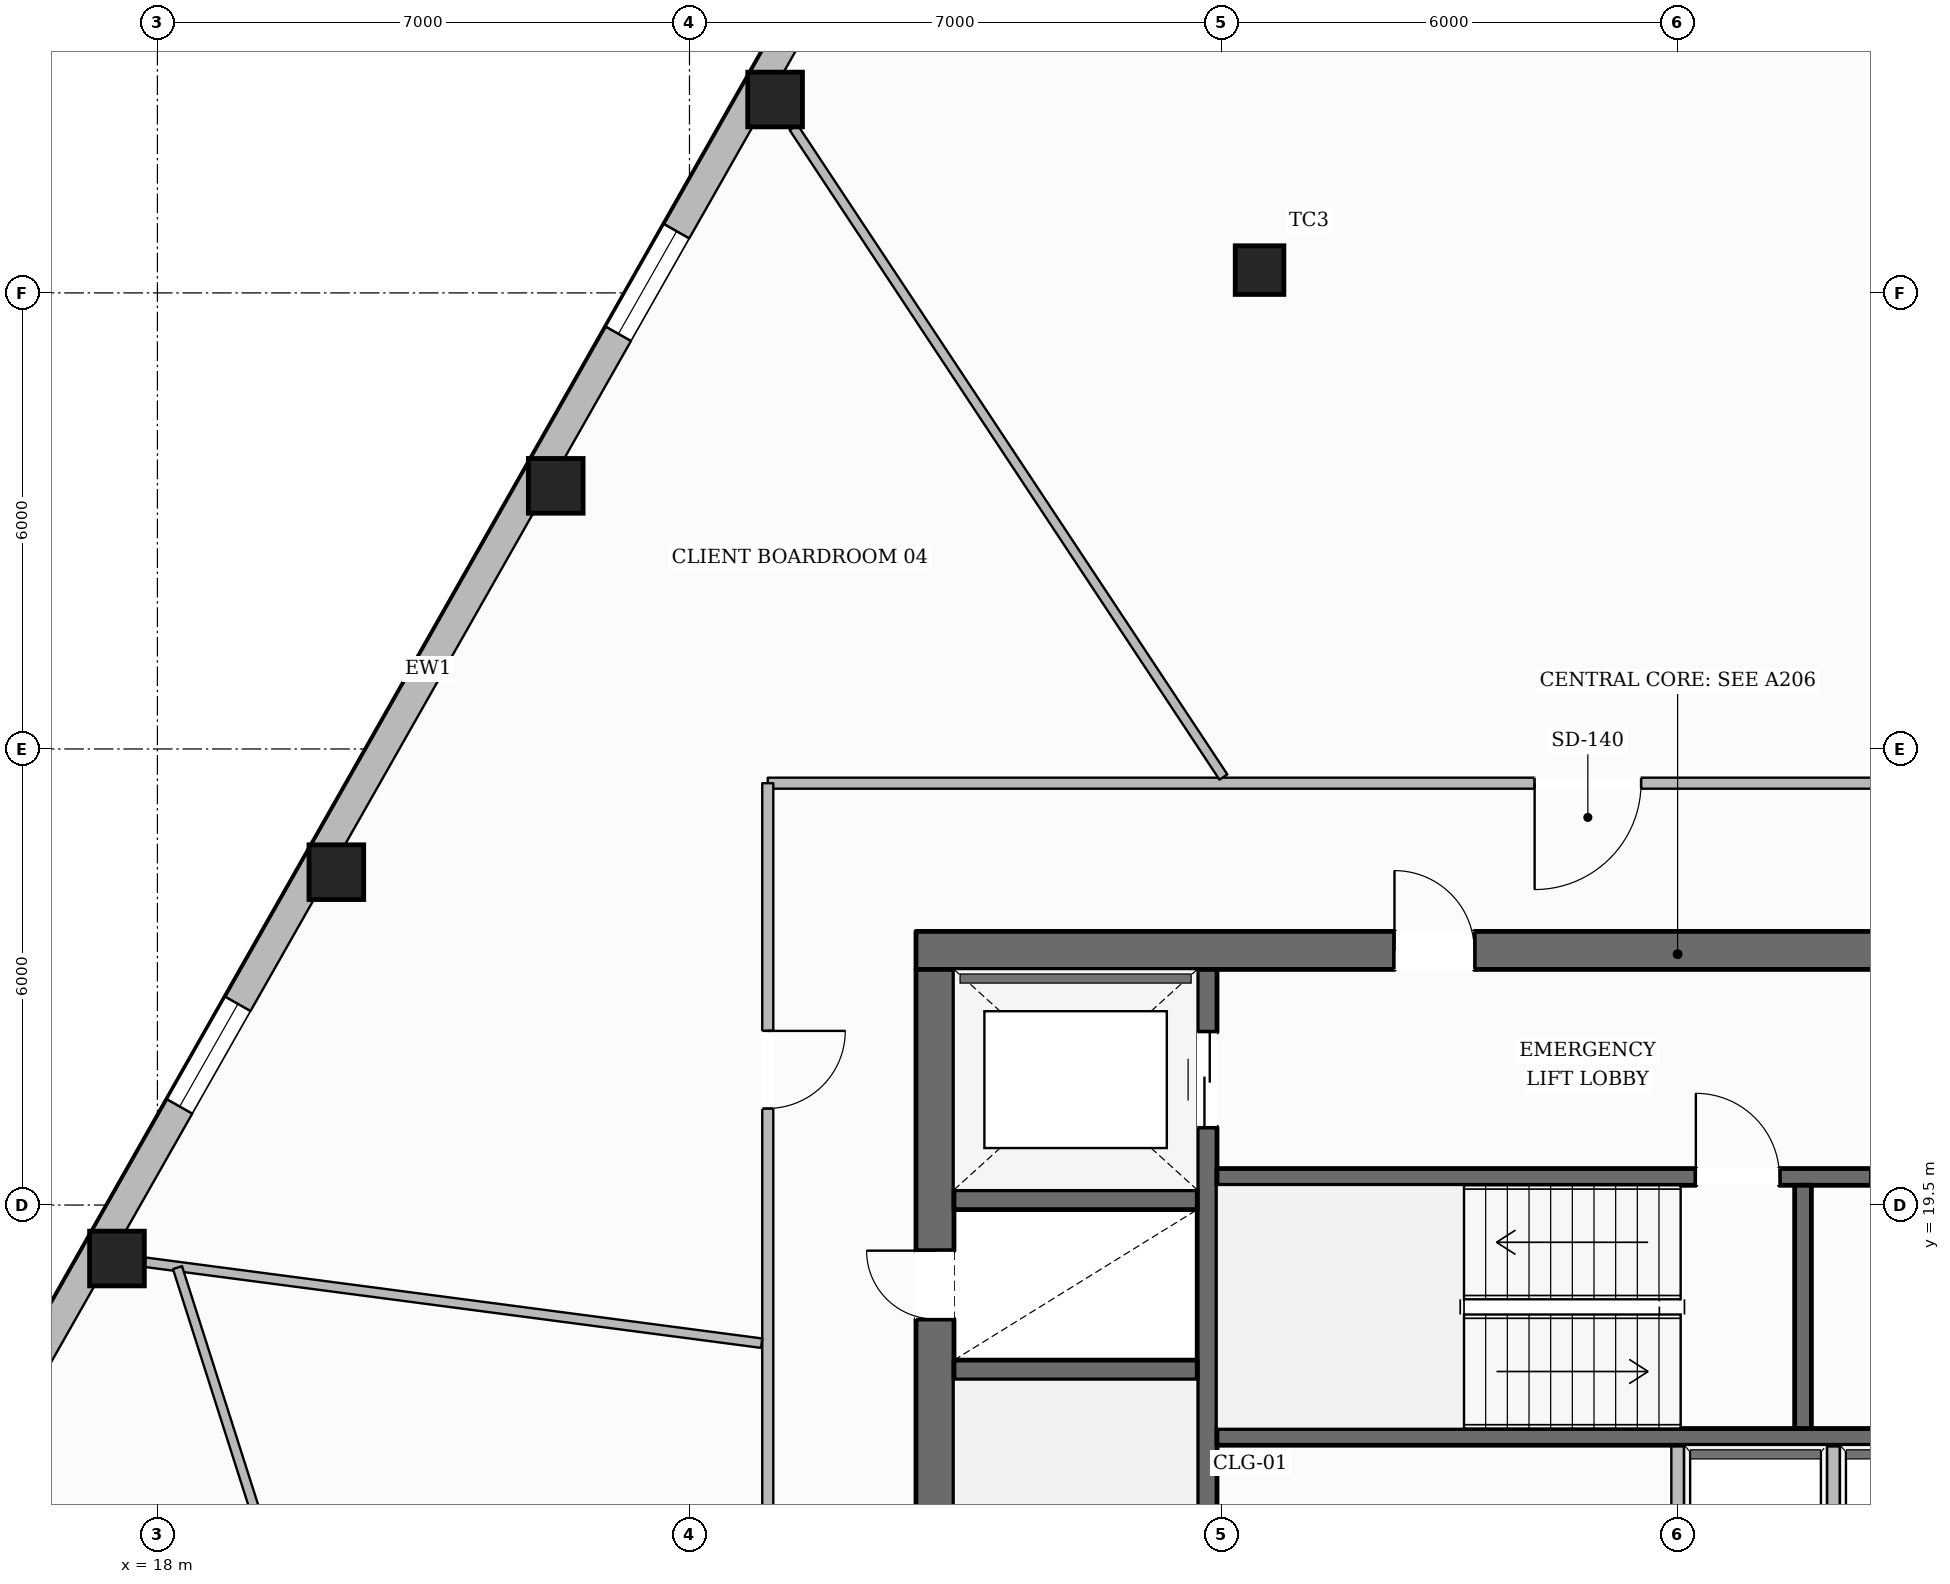
"""IFC4 building model, lengths in metres.
Left out: names, types, materials, properties, quantities, classifications, styles, units other than length and angle.
Written with IfcOpenShell. Run it as: python <this file> out.ifc"""

import sys

from ifc_helpers import new_model, si_unit, direction, frame, frame_2d, origin, origin_2d, place, context, subcontext, project, spatial, rectangle, hollow_rectangle, extrude, element, fill, save


model = new_model("IFC4")
c1 = context("Model", 3, precision=1e-05, world=origin(), true_north=direction((0.0, 1.0)))
c2 = subcontext(c1, "Body", "Model", "MODEL_VIEW")
j1 = project(units=[si_unit("LENGTHUNIT", "METRE"), si_unit("PLANEANGLEUNIT", "RADIAN")], contexts=[c1])
p1 = place(None, origin())
s1 = spatial("IfcSite", under=j1, at=p1, CompositionType="ELEMENT")
p2 = place(p1, origin())
s2 = spatial("IfcBuilding", under=s1, at=p2, CompositionType="ELEMENT")
p3 = place(p2, frame((0.0, 0.0, 97.05)))
s3 = spatial("IfcBuildingStorey", under=s2, at=p3, CompositionType="ELEMENT", Elevation=97.05)
p4 = place(p3, frame((27.98, 22.85, 0.0), z_axis=(0.0, 0.0, 1.0), x_axis=(1.0, 0.0, 0.0)))
e1 = element("IfcWall", 1, at=p4, inside=s3, PredefinedType="SOLIDWALL", context=c2, shape_type="SweptSolid", body=[
    extrude(rectangle(XDim=20.04, YDim=0.5, at=frame_2d((10.02, 0.0))), origin(), (0.0, 0.0, 1.0), 3.6),
])
p5 = place(p4, frame((6.295, 0.0, 0.0)))
e2 = element("IfcOpeningElement", 2, at=p5, cuts=e1, PredefinedType="OPENING", context=c2, shape_type="SweptSolid", body=[
    extrude(rectangle(XDim=1.05, YDim=2.15, at=frame_2d((0.525, 1.075))), frame((0.0, 0.26, 0.0), z_axis=(0.0, -1.0, 0.0), x_axis=(1.0, 0.0, 0.0)), (0.0, 0.0, 1.0), 0.52),
])
p6 = place(p4, frame((12.695, 0.0, 0.0)))
e3 = element("IfcOpeningElement", 3, at=p6, cuts=e1, PredefinedType="OPENING", context=c2, shape_type="SweptSolid", body=[
    extrude(rectangle(XDim=1.05, YDim=2.15, at=frame_2d((0.525, 1.075))), frame((0.0, 0.26, 0.0), z_axis=(0.0, -1.0, 0.0), x_axis=(1.0, 0.0, 0.0)), (0.0, 0.0, 1.0), 0.52),
])
p7 = place(p3, frame((28.23, 9.6, 0.0), z_axis=(0.0, 0.0, 1.0), x_axis=(0.0, 1.0, 0.0)))
e4 = element("IfcWall", 4, at=p7, inside=s3, PredefinedType="SOLIDWALL", context=c2, shape_type="SweptSolid", body=[
    extrude(rectangle(XDim=13.0, YDim=0.5, at=frame_2d((6.5, 0.0))), origin(), (0.0, 0.0, 1.0), 3.6),
])
p8 = place(p7, frame((0.2, 0.0, 0.0)))
e5 = element("IfcOpeningElement", 5, at=p8, cuts=e4, PredefinedType="OPENING", context=c2, shape_type="SweptSolid", body=[
    extrude(rectangle(XDim=1.1, YDim=2.15, at=frame_2d((0.55, 1.075))), frame((0.0, 0.26, 0.0), z_axis=(0.0, -1.0, 0.0), x_axis=(1.0, 0.0, 0.0)), (0.0, 0.0, 1.0), 0.52),
])
p9 = place(p7, frame((8.4, 0.0, 0.0)))
e6 = element("IfcOpeningElement", 6, at=p9, cuts=e4, PredefinedType="OPENING", context=c2, shape_type="SweptSolid", body=[
    extrude(rectangle(XDim=0.9, YDim=2.1, at=frame_2d((0.45, 1.05))), frame((0.0, 0.26, 0.0), z_axis=(0.0, -1.0, 0.0), x_axis=(1.0, 0.0, 0.0)), (0.0, 0.0, 1.0), 0.52),
])
p10 = place(p3, frame((31.81, 9.6, 0.0), z_axis=(0.0, 0.0, 1.0), x_axis=(0.0, 1.0, 0.0)))
e7 = element("IfcWall", 7, at=p10, inside=s3, PredefinedType="SHEAR", context=c2, shape_type="SweptSolid", body=[
    extrude(rectangle(XDim=13.0, YDim=0.26, at=frame_2d((6.5, 0.0))), origin(), (0.0, 0.0, 1.0), 3.6),
])
p11 = place(p10, frame((10.925, 0.0, 0.0)))
e8 = element("IfcOpeningElement", 8, at=p11, cuts=e7, PredefinedType="OPENING", context=c2, shape_type="SweptSolid", body=[
    extrude(rectangle(XDim=1.25, YDim=2.25, at=frame_2d((0.625, 1.125))), frame((0.0, 0.14, 0.0), z_axis=(0.0, -1.0, 0.0), x_axis=(1.0, 0.0, 0.0)), (0.0, 0.0, 1.0), 0.28),
])
for number, where, z_axis, x_axis in (
    (9, (28.48, 17.33, 0.0), (0.0, 0.0, 1.0), (1.0, 0.0, 0.0)),
    (10, (28.48, 19.57, 0.0), (0.0, 0.0, 1.0), (1.0, 0.0, 0.0)),
):
    element("IfcWall", number, at=place(p3, frame(where, z_axis=z_axis, x_axis=x_axis)), inside=s3, PredefinedType="SHEAR", context=c2, shape_type="SweptSolid", body=[
        extrude(rectangle(XDim=3.2, YDim=0.26, at=frame_2d((1.6, 0.0))), origin(), (0.0, 0.0, 1.0), 3.6),
    ])
p12 = place(p3, frame((31.94, 19.87, 0.0), z_axis=(0.0, 0.0, 1.0), x_axis=(1.0, 0.0, 0.0)))
e11 = element("IfcWall", 11, at=p12, inside=s3, PredefinedType="SOLIDWALL", context=c2, shape_type="SweptSolid", body=[
    extrude(rectangle(XDim=12.12, YDim=0.22, at=frame_2d((6.06, 0.0))), origin(), (0.0, 0.0, 1.0), 3.6),
])
p13 = place(p12, frame((6.3, 0.0, 0.0)))
e12 = element("IfcOpeningElement", 12, at=p13, cuts=e11, PredefinedType="OPENING", context=c2, shape_type="SweptSolid", body=[
    extrude(rectangle(XDim=1.1, YDim=2.15, at=frame_2d((0.55, 1.075))), frame((0.0, 0.12, 0.0), z_axis=(0.0, -1.0, 0.0), x_axis=(1.0, 0.0, 0.0)), (0.0, 0.0, 1.0), 0.24),
])
p14 = place(p12, frame((8.61, 0.0, 0.0)))
e13 = element("IfcOpeningElement", 13, at=p14, cuts=e11, PredefinedType="OPENING", context=c2, shape_type="SweptSolid", body=[
    extrude(rectangle(XDim=0.9, YDim=2.1, at=frame_2d((0.45, 1.05))), frame((0.0, 0.12, 0.0), z_axis=(0.0, -1.0, 0.0), x_axis=(1.0, 0.0, 0.0)), (0.0, 0.0, 1.0), 0.24),
])
p15 = place(p12, frame((10.85, 0.0, 0.0)))
e14 = element("IfcOpeningElement", 14, at=p15, cuts=e11, PredefinedType="OPENING", context=c2, shape_type="SweptSolid", body=[
    extrude(rectangle(XDim=0.9, YDim=2.1, at=frame_2d((0.45, 1.05))), frame((0.0, 0.12, 0.0), z_axis=(0.0, -1.0, 0.0), x_axis=(1.0, 0.0, 0.0)), (0.0, 0.0, 1.0), 0.24),
])
p16 = place(p3, frame((31.94, 16.45, 0.0), z_axis=(0.0, 0.0, 1.0), x_axis=(1.0, 0.0, 0.0)))
e15 = element("IfcWall", 15, at=p16, inside=s3, PredefinedType="SOLIDWALL", context=c2, shape_type="SweptSolid", body=[
    extrude(rectangle(XDim=12.12, YDim=0.22, at=frame_2d((6.06, 0.0))), origin(), (0.0, 0.0, 1.0), 3.6),
])
p17 = place(p3, frame((39.65, 16.56, 0.0), z_axis=(0.0, 0.0, 1.0), x_axis=(0.0, 1.0, 0.0)))
e16 = element("IfcWall", 16, at=p17, inside=s3, PredefinedType="SOLIDWALL", context=c2, shape_type="SweptSolid", body=[
    extrude(rectangle(XDim=3.2, YDim=0.22, at=frame_2d((1.6, 0.0))), origin(), (0.0, 0.0, 1.0), 3.6),
])
for number, where, z_axis, x_axis in (
    (17, (26.126, 34.044, 0.0), (0.0, 0.0, 1.0), (1.0, 0.0, 0.0)),
    (18, (23.24, 28.962, 0.0), (0.0, 0.0, 1.0), (1.0, 0.0, 0.0)),
    (19, (20.354, 23.879, 0.0), (0.0, 0.0, 1.0), (1.0, 0.0, 0.0)),
    (20, (17.468, 18.796, 0.0), (0.0, 0.0, 1.0), (1.0, 0.0, 0.0)),
):
    element("IfcColumn", number, at=place(p3, frame(where, z_axis=z_axis, x_axis=x_axis)), inside=s3, PredefinedType="COLUMN", context=c2, shape_type="SweptSolid", body=[
        extrude(hollow_rectangle(XDim=0.72, YDim=0.72, WallThickness=0.032, at=origin_2d()), origin(), (0.0, 0.0, 1.0), 3.6),
    ])
p18 = place(p3, frame((32.5, 31.8, 0.0), z_axis=(0.0, 0.0, 1.0), x_axis=(1.0, 0.0, 0.0)))
e21 = element("IfcColumn", 21, at=p18, inside=s3, PredefinedType="COLUMN", context=c2, shape_type="SweptSolid", body=[
    extrude(hollow_rectangle(XDim=0.64, YDim=0.64, WallThickness=0.028, at=origin_2d()), origin(), (0.0, 0.0, 1.0), 3.6),
])
p19 = place(p3, frame((14.113, 13.436, 0.0), z_axis=(0.0, 0.0, 1.0), x_axis=(0.493785476093, 0.869583753068, 0.0)))
e22 = element("IfcWall", 22, at=p19, inside=s3, PredefinedType="STANDARD", context=c2, shape_type="SweptSolid", body=[
    extrude(rectangle(XDim=36.023, YDim=0.38, at=frame_2d((18.011, 0.0))), origin(), (0.0, 0.0, 1.0), 3.059),
])
p20 = place(p19, frame((26.417, 0.0, 0.0)))
e23 = element("IfcOpeningElement", 23, at=p20, cuts=e22, PredefinedType="OPENING", context=c2, shape_type="SweptSolid", body=[
    extrude(rectangle(XDim=1.0, YDim=2.2, at=frame_2d((0.5, 1.1))), frame((0.0, 0.2, 0.0), z_axis=(0.0, -1.0, 0.0), x_axis=(1.0, 0.0, 0.0)), (0.0, 0.0, 1.0), 0.4),
])
p21 = place(p19, frame((31.845, 0.0, 0.65)))
e24 = element("IfcOpeningElement", 24, at=p21, cuts=e22, PredefinedType="OPENING", context=c2, shape_type="SweptSolid", body=[
    extrude(rectangle(XDim=1.55, YDim=1.75, at=frame_2d((0.775, 0.875))), frame((0.0, 0.2, 0.0), z_axis=(0.0, -1.0, 0.0), x_axis=(1.0, 0.0, 0.0)), (0.0, 0.0, 1.0), 0.4),
])
p22 = place(p19, frame((20.156, 0.0, 0.65)))
e25 = element("IfcOpeningElement", 25, at=p22, cuts=e22, PredefinedType="OPENING", context=c2, shape_type="SweptSolid", body=[
    extrude(rectangle(XDim=1.55, YDim=1.75, at=frame_2d((0.775, 0.875))), frame((0.0, 0.2, 0.0), z_axis=(0.0, -1.0, 0.0), x_axis=(1.0, 0.0, 0.0)), (0.0, 0.0, 1.0), 0.4),
])
p23 = place(p19, frame((8.466, 0.0, 0.65)))
e26 = element("IfcOpeningElement", 26, at=p23, cuts=e22, PredefinedType="OPENING", context=c2, shape_type="SweptSolid", body=[
    extrude(rectangle(XDim=1.55, YDim=1.75, at=frame_2d((0.775, 0.875))), frame((0.0, 0.2, 0.0), z_axis=(0.0, -1.0, 0.0), x_axis=(1.0, 0.0, 0.0)), (0.0, 0.0, 1.0), 0.4),
])
p24 = place(p19, frame((2.621, 0.0, 0.65)))
e27 = element("IfcOpeningElement", 27, at=p24, cuts=e22, PredefinedType="OPENING", context=c2, shape_type="SweptSolid", body=[
    extrude(rectangle(XDim=1.55, YDim=1.75, at=frame_2d((0.775, 0.875))), frame((0.0, 0.2, 0.0), z_axis=(0.0, -1.0, 0.0), x_axis=(1.0, 0.0, 0.0)), (0.0, 0.0, 1.0), 0.4),
])
for number, where, z_axis, x_axis in (
    (28, (38.0, 14.1, 0.0), (0.0, 0.0, 1.0), (0.0, 1.0, 0.0)),
    (29, (40.05, 14.1, 0.0), (0.0, 0.0, 1.0), (0.0, 1.0, 0.0)),
):
    element("IfcWall", number, at=place(p3, frame(where, z_axis=z_axis, x_axis=x_axis)), inside=s3, PredefinedType="PARTITIONING", context=c2, shape_type="SweptSolid", body=[
        extrude(rectangle(XDim=2.24, YDim=0.165, at=frame_2d((1.12, 0.0))), origin(), (0.0, 0.0, 1.0), 3.6),
    ])
p25 = place(p3, frame((49.97, 25.05, 0.0), z_axis=(0.0, 0.0, 1.0), x_axis=(-1.0, 0.0, 0.0)))
e30 = element("IfcWall", 30, at=p25, inside=s3, PredefinedType="PARTITIONING", context=c2, shape_type="SweptSolid", body=[
    extrude(rectangle(XDim=23.94, YDim=0.145, at=frame_2d((11.97, 0.0))), origin(), (0.0, 0.0, 1.0), 3.6),
])
p26 = place(p25, frame((3.577, 0.0, 0.0)))
e31 = element("IfcOpeningElement", 31, at=p26, cuts=e30, PredefinedType="OPENING", context=c2, shape_type="SweptSolid", body=[
    extrude(rectangle(XDim=1.02, YDim=2.15, at=frame_2d((0.51, 1.075))), frame((0.0, 0.083, 0.0), z_axis=(0.0, -1.0, 0.0), x_axis=(1.0, 0.0, 0.0)), (0.0, 0.0, 1.0), 0.165),
])
p27 = place(p25, frame((12.451, 0.0, 0.0)))
e32 = element("IfcOpeningElement", 32, at=p27, cuts=e30, PredefinedType="OPENING", context=c2, shape_type="SweptSolid", body=[
    extrude(rectangle(XDim=1.4, YDim=2.2, at=frame_2d((0.7, 1.1))), frame((0.0, 0.083, 0.0), z_axis=(0.0, -1.0, 0.0), x_axis=(1.0, 0.0, 0.0)), (0.0, 0.0, 1.0), 0.165),
])
p28 = place(p3, frame((26.03, 25.05, 0.0), z_axis=(0.0, 0.0, 1.0), x_axis=(0.0, -1.0, 0.0)))
e33 = element("IfcWall", 33, at=p28, inside=s3, PredefinedType="PARTITIONING", context=c2, shape_type="SweptSolid", body=[
    extrude(rectangle(XDim=17.9, YDim=0.145, at=frame_2d((8.95, 0.0))), origin(), (0.0, 0.0, 1.0), 3.288),
])
p29 = place(p28, frame((3.259, 0.0, 0.0)))
e34 = element("IfcOpeningElement", 34, at=p29, cuts=e33, PredefinedType="OPENING", context=c2, shape_type="SweptSolid", body=[
    extrude(rectangle(XDim=1.02, YDim=2.15, at=frame_2d((0.51, 1.075))), frame((0.0, 0.083, 0.0), z_axis=(0.0, -1.0, 0.0), x_axis=(1.0, 0.0, 0.0)), (0.0, 0.0, 1.0), 0.165),
])
p30 = place(p28, frame((12.038, 0.0, 0.0)))
e35 = element("IfcOpeningElement", 35, at=p30, cuts=e33, PredefinedType="OPENING", context=c2, shape_type="SweptSolid", body=[
    extrude(rectangle(XDim=1.02, YDim=2.15, at=frame_2d((0.51, 1.075))), frame((0.0, 0.083, 0.0), z_axis=(0.0, -1.0, 0.0), x_axis=(1.0, 0.0, 0.0)), (0.0, 0.0, 1.0), 0.165),
])
p31 = place(p3, frame((32.025, 25.131, 0.0), z_axis=(0.0, 0.0, 1.0), x_axis=(-0.55183790472, 0.833951393616, 0.0)))
e36 = element("IfcWall", 36, at=p31, inside=s3, PredefinedType="PARTITIONING", context=c2, shape_type="SweptSolid", body=[
    extrude(rectangle(XDim=10.247, YDim=0.125, at=frame_2d((5.124, 0.0))), origin(), (0.0, 0.0, 1.0), 3.6),
])
p32 = place(p3, frame((25.949, 17.683, 0.0), z_axis=(0.0, 0.0, 1.0), x_axis=(-0.991488077313, 0.130197513598, 0.0)))
e37 = element("IfcWall", 37, at=p32, inside=s3, PredefinedType="PARTITIONING", context=c2, shape_type="SweptSolid", body=[
    extrude(rectangle(XDim=8.183, YDim=0.125, at=frame_2d((4.092, 0.0))), origin(), (0.0, 0.0, 1.0), 3.141),
])
p33 = place(p3, frame((18.264, 18.677, 0.0), z_axis=(0.0, 0.0, 1.0), x_axis=(0.303993518428, -0.95267409997, 0.0)))
e38 = element("IfcWall", 38, at=p33, inside=s3, PredefinedType="PARTITIONING", context=c2, shape_type="SweptSolid", body=[
    extrude(rectangle(XDim=16.673, YDim=0.125, at=frame_2d((8.336, 0.0))), origin(), (0.0, 0.0, 1.0), 3.288),
])
p34 = place(p33, frame((7.941, 0.0, 0.0)))
e39 = element("IfcOpeningElement", 39, at=p34, cuts=e38, PredefinedType="OPENING", context=c2, shape_type="SweptSolid", body=[
    extrude(rectangle(XDim=1.02, YDim=2.15, at=frame_2d((0.51, 1.075))), frame((0.0, 0.073, 0.0), z_axis=(0.0, -1.0, 0.0), x_axis=(1.0, 0.0, 0.0)), (0.0, 0.0, 1.0), 0.145),
])
p35 = place(p22, origin())
e40 = element("IfcWindow", 40, at=p35, inside=s3, PartitioningType="SINGLE_PANEL", PredefinedType="WINDOW", context=c2, shape_type="SweptSolid", body=[
    extrude(rectangle(XDim=1.55, YDim=1.75, at=frame_2d((0.775, 0.875))), frame((0.0, 0.03, 0.0), z_axis=(0.0, -1.0, 0.0), x_axis=(1.0, 0.0, 0.0)), (0.0, 0.0, 1.0), 0.06),
])
fill(e25, e40)
p36 = place(p23, origin())
e41 = element("IfcWindow", 41, at=p36, inside=s3, PartitioningType="SINGLE_PANEL", PredefinedType="WINDOW", context=c2, shape_type="SweptSolid", body=[
    extrude(rectangle(XDim=1.55, YDim=1.75, at=frame_2d((0.775, 0.875))), frame((0.0, 0.03, 0.0), z_axis=(0.0, -1.0, 0.0), x_axis=(1.0, 0.0, 0.0)), (0.0, 0.0, 1.0), 0.06),
])
fill(e26, e41)
p37 = place(p13, origin())
e42 = element("IfcDoor", 42, at=p37, inside=s3, OperationType="SINGLE_SWING_LEFT", PredefinedType="DOOR", context=c2, shape_type="SweptSolid", body=[
    extrude(rectangle(XDim=1.1, YDim=2.15, at=frame_2d((0.55, 1.075))), frame((0.0, 0.025, 0.0), z_axis=(0.0, -1.0, 0.0), x_axis=(1.0, 0.0, 0.0)), (0.0, 0.0, 1.0), 0.05),
])
fill(e12, e42)
p38 = place(p9, origin())
e43 = element("IfcDoor", 43, at=p38, inside=s3, OperationType="SINGLE_SWING_RIGHT", PredefinedType="DOOR", context=c2, shape_type="SweptSolid", body=[
    extrude(rectangle(XDim=0.9, YDim=2.1, at=frame_2d((0.45, 1.05))), frame((0.0, 0.025, 0.0), z_axis=(0.0, -1.0, 0.0), x_axis=(1.0, 0.0, 0.0)), (0.0, 0.0, 1.0), 0.05),
])
fill(e6, e43)
p39 = place(p5, origin())
e44 = element("IfcDoor", 44, at=p39, inside=s3, OperationType="SINGLE_SWING_LEFT", PredefinedType="DOOR", context=c2, shape_type="SweptSolid", body=[
    extrude(rectangle(XDim=1.05, YDim=2.15, at=frame_2d((0.525, 1.075))), frame((0.0, 0.025, 0.0), z_axis=(0.0, -1.0, 0.0), x_axis=(1.0, 0.0, 0.0)), (0.0, 0.0, 1.0), 0.05),
])
fill(e2, e44)
p40 = place(p11, origin())
e45 = element("IfcDoor", 45, at=p40, inside=s3, OperationType="DOUBLE_DOOR_SLIDING", PredefinedType="DOOR", context=c2, shape_type="SweptSolid", body=[
    extrude(rectangle(XDim=1.25, YDim=2.25, at=frame_2d((0.625, 1.125))), frame((0.0, 0.025, 0.0), z_axis=(0.0, -1.0, 0.0), x_axis=(1.0, 0.0, 0.0)), (0.0, 0.0, 1.0), 0.05),
])
fill(e8, e45)
p41 = place(p27, origin())
e46 = element("IfcDoor", 46, at=p41, inside=s3, OperationType="SINGLE_SWING_RIGHT", PredefinedType="DOOR", context=c2, shape_type="SweptSolid", body=[
    extrude(rectangle(XDim=1.4, YDim=2.2, at=frame_2d((0.7, 1.1))), frame((0.0, 0.025, 0.0), z_axis=(0.0, -1.0, 0.0), x_axis=(1.0, 0.0, 0.0)), (0.0, 0.0, 1.0), 0.05),
])
fill(e32, e46)
p42 = place(p29, origin())
e47 = element("IfcDoor", 47, at=p42, inside=s3, OperationType="SINGLE_SWING_LEFT", PredefinedType="DOOR", context=c2, shape_type="SweptSolid", body=[
    extrude(rectangle(XDim=1.02, YDim=2.15, at=frame_2d((0.51, 1.075))), frame((0.0, 0.025, 0.0), z_axis=(0.0, -1.0, 0.0), x_axis=(1.0, 0.0, 0.0)), (0.0, 0.0, 1.0), 0.05),
])
fill(e34, e47)
save(model, sys.argv[1])
